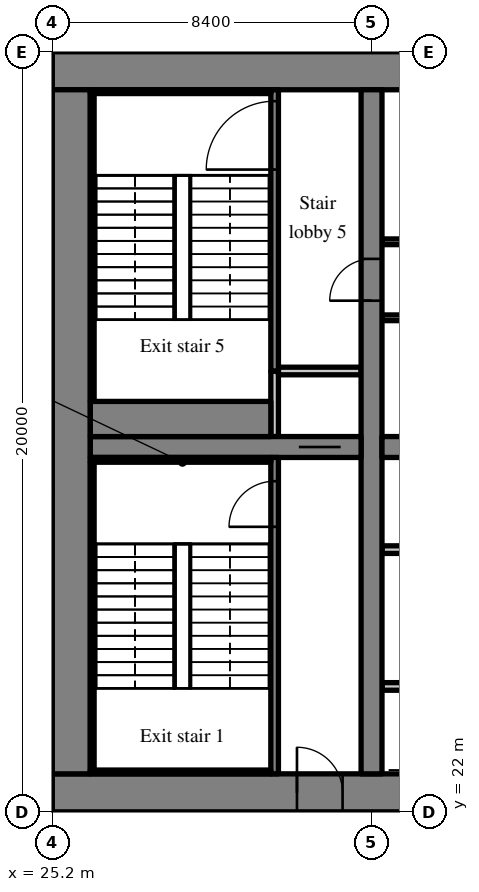
"""IFC4 building model, lengths in metres.
Left out: names, types, materials, properties, quantities, classifications, styles, units other than length and angle.
Written with IfcOpenShell. Run it as: python <this file> out.ifc"""

import sys

from ifc_helpers import new_model, si_unit, direction, frame, frame_2d, origin, place, context, subcontext, project, spatial, rectangle, extrude, source, transform, mapped, element, fill, save


model = new_model("IFC4")
c1 = context("Model", 3, precision=1e-05, world=origin(), true_north=direction((0.0, 1.0)))
c2 = subcontext(c1, "Body", "Model", "MODEL_VIEW")
j1 = project(units=[si_unit("LENGTHUNIT", "METRE"), si_unit("PLANEANGLEUNIT", "RADIAN")], contexts=[c1])
p1 = place(None, origin())
s1 = spatial("IfcSite", under=j1, at=p1, CompositionType="ELEMENT")
p2 = place(p1, origin())
s2 = spatial("IfcBuilding", under=s1, at=p2, CompositionType="ELEMENT")
p3 = place(p2, frame((0.0, 0.0, 77.2)))
s3 = spatial("IfcBuildingStorey", under=s2, at=p3, CompositionType="ELEMENT", Elevation=77.2)
m1 = source(origin(), c2, "Body", "SweptSolid", [
    extrude(rectangle(XDim=50.4, YDim=1.0, at=frame_2d((25.2, 0.0))), origin(), (0.0, 0.0, 1.0), 3.52),
])
p4 = place(p3, frame((25.2, 22.5, 0.0), z_axis=(0.0, 0.0, 1.0), x_axis=(1.0, 0.0, 0.0)))
e1 = element("IfcWall", 1, at=p4, inside=s3, PredefinedType="SHEAR", context=c2, shape_type="MappedRepresentation", body=[
    mapped(m1, transform((0.0, 0.0, 0.0), scale=1.0)),
])
m2 = source(origin(), c2, "Body", "SweptSolid", [
    extrude(rectangle(XDim=1.8, YDim=2.1, at=frame_2d((0.9, 1.05))), frame((0.0, 0.51, 0.0), z_axis=(0.0, -1.0, 0.0), x_axis=(1.0, 0.0, 0.0)), (0.0, 0.0, 1.0), 1.02),
])
p5 = place(p4, frame((15.9, 0.0, 0.0)))
e2 = element("IfcOpeningElement", 2, at=p5, cuts=e1, PredefinedType="OPENING", context=c2, shape_type="MappedRepresentation", body=[
    mapped(m2, transform((0.0, 0.0, 0.0), scale=1.0)),
])
m3 = source(origin(), c2, "Body", "SweptSolid", [
    extrude(rectangle(XDim=1.2, YDim=2.1, at=frame_2d((0.6, 1.05))), frame((0.0, 0.51, 0.0), z_axis=(0.0, -1.0, 0.0), x_axis=(1.0, 0.0, 0.0)), (0.0, 0.0, 1.0), 1.02),
])
p6 = place(p4, frame((26.987, 0.0, 0.0)))
e3 = element("IfcOpeningElement", 3, at=p6, cuts=e1, PredefinedType="OPENING", context=c2, shape_type="MappedRepresentation", body=[
    mapped(m3, transform((0.0, 0.0, 0.0), scale=1.0)),
])
m4 = source(origin(), c2, "Body", "SweptSolid", [
    extrude(rectangle(XDim=0.9, YDim=2.1, at=frame_2d((0.45, 1.05))), frame((0.0, 0.51, 0.0), z_axis=(0.0, -1.0, 0.0), x_axis=(1.0, 0.0, 0.0)), (0.0, 0.0, 1.0), 1.02),
])
p7 = place(p4, frame((32.25, 0.0, 0.0)))
e4 = element("IfcOpeningElement", 4, at=p7, cuts=e1, PredefinedType="OPENING", context=c2, shape_type="MappedRepresentation", body=[
    mapped(m4, transform((0.0, 0.0, 0.0), scale=1.0)),
])
p8 = place(p4, frame((38.262, 0.0, 0.0)))
e5 = element("IfcOpeningElement", 5, at=p8, cuts=e1, PredefinedType="OPENING", context=c2, shape_type="MappedRepresentation", body=[
    mapped(m4, transform((0.0, 0.0, 0.0), scale=1.0)),
])
p9 = place(p4, frame((6.438, 0.0, 0.0)))
e6 = element("IfcOpeningElement", 6, at=p9, cuts=e1, PredefinedType="OPENING", context=c2, shape_type="MappedRepresentation", body=[
    mapped(m3, transform((0.0, 0.0, 0.0), scale=1.0)),
])
p10 = place(p4, frame((47.725, 0.0, 0.0)))
e7 = element("IfcOpeningElement", 7, at=p10, cuts=e1, PredefinedType="OPENING", context=c2, shape_type="MappedRepresentation", body=[
    mapped(m3, transform((0.0, 0.0, 0.0), scale=1.0)),
])
p11 = place(p3, frame((25.2, 41.5, 0.0), z_axis=(0.0, 0.0, 1.0), x_axis=(1.0, 0.0, 0.0)))
e8 = element("IfcWall", 8, at=p11, inside=s3, PredefinedType="SHEAR", context=c2, shape_type="MappedRepresentation", body=[
    mapped(m1, transform((0.0, 0.0, 0.0), scale=1.0)),
])
m5 = source(origin(), c2, "Body", "SweptSolid", [
    extrude(rectangle(XDim=18.0, YDim=1.0, at=frame_2d((9.0, 0.0))), origin(), (0.0, 0.0, 1.0), 3.52),
])
p12 = place(p3, frame((25.7, 23.0, 0.0), z_axis=(0.0, 0.0, 1.0), x_axis=(0.0, 1.0, 0.0)))
e9 = element("IfcWall", 9, at=p12, inside=s3, PredefinedType="SHEAR", context=c2, shape_type="MappedRepresentation", body=[
    mapped(m5, transform((0.0, 0.0, 0.0), scale=1.0)),
])
m6 = source(origin(), c2, "Body", "SweptSolid", [
    extrude(rectangle(XDim=18.0, YDim=0.55, at=frame_2d((9.0, 0.0))), origin(), (0.0, 0.0, 1.0), 3.52),
])
p13 = place(p3, frame((33.6, 23.0, 0.0), z_axis=(0.0, 0.0, 1.0), x_axis=(0.0, 1.0, 0.0)))
e10 = element("IfcWall", 10, at=p13, inside=s3, PredefinedType="SHEAR", context=c2, shape_type="MappedRepresentation", body=[
    mapped(m6, transform((0.0, 0.0, 0.0), scale=1.0)),
])
m7 = source(origin(), c2, "Body", "SweptSolid", [
    extrude(rectangle(XDim=1.1, YDim=2.1, at=frame_2d((0.55, 1.05))), frame((0.0, 0.285, 0.0), z_axis=(0.0, -1.0, 0.0), x_axis=(1.0, 0.0, 0.0)), (0.0, 0.0, 1.0), 0.57),
])
p14 = place(p13, frame((12.45, 0.0, 0.0)))
e11 = element("IfcOpeningElement", 11, at=p14, cuts=e10, PredefinedType="OPENING", context=c2, shape_type="MappedRepresentation", body=[
    mapped(m7, transform((0.0, 0.0, 0.0), scale=1.0)),
])
m8 = source(origin(), c2, "Body", "SweptSolid", [
    extrude(rectangle(XDim=7.125, YDim=0.55, at=frame_2d((3.562, 0.0))), origin(), (0.0, 0.0, 1.0), 3.52),
])
p15 = place(p3, frame((26.2, 31.6, 0.0), z_axis=(0.0, 0.0, 1.0), x_axis=(1.0, 0.0, 0.0)))
e12 = element("IfcWall", 12, at=p15, inside=s3, PredefinedType="SHEAR", context=c2, shape_type="MappedRepresentation", body=[
    mapped(m8, transform((0.0, 0.0, 0.0), scale=1.0)),
])
p16 = place(p15, frame((5.488, 0.0, 0.0)))
e13 = element("IfcOpeningElement", 13, at=p16, cuts=e12, PredefinedType="OPENING", context=c2, shape_type="MappedRepresentation", body=[
    mapped(m7, transform((0.0, 0.0, 0.0), scale=1.0)),
])
m9 = source(origin(), c2, "Body", "SweptSolid", [
    extrude(rectangle(XDim=16.25, YDim=0.55, at=frame_2d((8.125, 0.0))), origin(), (0.0, 0.0, 1.0), 3.52),
])
p17 = place(p3, frame((33.875, 31.6, 0.0), z_axis=(0.0, 0.0, 1.0), x_axis=(1.0, 0.0, 0.0)))
e14 = element("IfcWall", 14, at=p17, inside=s3, PredefinedType="SHEAR", context=c2, shape_type="MappedRepresentation", body=[
    mapped(m9, transform((0.0, 0.0, 0.0), scale=1.0)),
])
m10 = source(origin(), c2, "Body", "SweptSolid", [
    extrude(rectangle(XDim=1.0, YDim=2.1, at=frame_2d((0.5, 1.05))), frame((0.0, 0.285, 0.0), z_axis=(0.0, -1.0, 0.0), x_axis=(1.0, 0.0, 0.0)), (0.0, 0.0, 1.0), 0.57),
])
p18 = place(p17, frame((14.687, 0.0, 0.0)))
e15 = element("IfcOpeningElement", 15, at=p18, cuts=e14, PredefinedType="OPENING", context=c2, shape_type="MappedRepresentation", body=[
    mapped(m10, transform((0.0, 0.0, 0.0), scale=1.0)),
])
m11 = source(origin(), c2, "Body", "SweptSolid", [
    extrude(rectangle(XDim=3.559, YDim=0.3, at=frame_2d((1.78, 0.0))), origin(), (0.0, 0.0, 1.0), 3.52),
])
p19 = place(p3, frame((25.55, 39.969, 0.0), z_axis=(0.0, 0.0, 1.0), x_axis=(-0.35779745313, 0.933799219604, 0.0)))
e16 = element("IfcWall", 16, at=p19, inside=s3, PredefinedType="SOLIDWALL", context=c2, shape_type="MappedRepresentation", body=[
    mapped(m11, transform((0.0, 0.0, 0.0), scale=1.0)),
])
m12 = source(origin(), c2, "Body", "SweptSolid", [
    extrude(rectangle(XDim=1.5, YDim=2.0, at=frame_2d((0.75, 1.0))), frame((0.0, 0.16, 0.0), z_axis=(0.0, -1.0, 0.0), x_axis=(1.0, 0.0, 0.0)), (0.0, 0.0, 1.0), 0.32),
])
p20 = place(p19, frame((1.903, 0.0, 0.9)))
e17 = element("IfcOpeningElement", 17, at=p20, cuts=e16, PredefinedType="OPENING", context=c2, shape_type="MappedRepresentation", body=[
    mapped(m12, transform((0.0, 0.0, 0.0), scale=1.0)),
])
m13 = source(origin(), c2, "Body", "SweptSolid", [
    extrude(rectangle(XDim=6.025, YDim=0.2, at=frame_2d((3.012, 0.0))), origin(), (0.0, 0.0, 1.0), 3.52),
])
p21 = place(p3, frame((33.875, 25.3, 0.0), z_axis=(0.0, 0.0, 1.0), x_axis=(1.0, 0.0, 0.0)))
e18 = element("IfcWall", 18, at=p21, inside=s3, PredefinedType="SOLIDWALL", context=c2, shape_type="MappedRepresentation", body=[
    mapped(m13, transform((0.0, 0.0, 0.0), scale=1.0)),
])
m14 = source(origin(), c2, "Body", "SweptSolid", [
    extrude(rectangle(XDim=1.1, YDim=2.1, at=frame_2d((0.55, 1.05))), frame((0.0, 0.11, 0.0), z_axis=(0.0, -1.0, 0.0), x_axis=(1.0, 0.0, 0.0)), (0.0, 0.0, 1.0), 0.22),
])
p22 = place(p21, frame((0.975, 0.0, 0.0)))
e19 = element("IfcOpeningElement", 19, at=p22, cuts=e18, PredefinedType="OPENING", context=c2, shape_type="MappedRepresentation", body=[
    mapped(m14, transform((0.0, 0.0, 0.0), scale=1.0)),
])
p23 = place(p21, frame((3.975, 0.0, 0.0)))
e20 = element("IfcOpeningElement", 20, at=p23, cuts=e18, PredefinedType="OPENING", context=c2, shape_type="MappedRepresentation", body=[
    mapped(m14, transform((0.0, 0.0, 0.0), scale=1.0)),
])
m15 = source(origin(), c2, "Body", "SweptSolid", [
    extrude(rectangle(XDim=12.025, YDim=0.2, at=frame_2d((6.012, 0.0))), origin(), (0.0, 0.0, 1.0), 3.52),
])
p24 = place(p3, frame((33.875, 28.9, 0.0), z_axis=(0.0, 0.0, 1.0), x_axis=(1.0, 0.0, 0.0)))
e21 = element("IfcWall", 21, at=p24, inside=s3, PredefinedType="SOLIDWALL", context=c2, shape_type="MappedRepresentation", body=[
    mapped(m15, transform((0.0, 0.0, 0.0), scale=1.0)),
])
p25 = place(p24, frame((0.975, 0.0, 0.0)))
e22 = element("IfcOpeningElement", 22, at=p25, cuts=e21, PredefinedType="OPENING", context=c2, shape_type="MappedRepresentation", body=[
    mapped(m14, transform((0.0, 0.0, 0.0), scale=1.0)),
])
p26 = place(p24, frame((3.975, 0.0, 0.0)))
e23 = element("IfcOpeningElement", 23, at=p26, cuts=e21, PredefinedType="OPENING", context=c2, shape_type="MappedRepresentation", body=[
    mapped(m14, transform((0.0, 0.0, 0.0), scale=1.0)),
])
p27 = place(p24, frame((6.975, 0.0, 0.0)))
e24 = element("IfcOpeningElement", 24, at=p27, cuts=e21, PredefinedType="OPENING", context=c2, shape_type="MappedRepresentation", body=[
    mapped(m14, transform((0.0, 0.0, 0.0), scale=1.0)),
])
p28 = place(p24, frame((9.975, 0.0, 0.0)))
e25 = element("IfcOpeningElement", 25, at=p28, cuts=e21, PredefinedType="OPENING", context=c2, shape_type="MappedRepresentation", body=[
    mapped(m14, transform((0.0, 0.0, 0.0), scale=1.0)),
])
m16 = source(origin(), c2, "Body", "SweptSolid", [
    extrude(rectangle(XDim=14.125, YDim=0.15, at=frame_2d((7.062, 0.0))), origin(), (0.0, 0.0, 1.0), 3.52),
])
p29 = place(p3, frame((33.875, 35.0, 0.0), z_axis=(0.0, 0.0, 1.0), x_axis=(1.0, 0.0, 0.0)))
e26 = element("IfcWall", 26, at=p29, inside=s3, PredefinedType="PARTITIONING", context=c2, shape_type="MappedRepresentation", body=[
    mapped(m16, transform((0.0, 0.0, 0.0), scale=1.0)),
])
m17 = source(origin(), c2, "Body", "SweptSolid", [
    extrude(rectangle(XDim=0.9, YDim=2.1, at=frame_2d((0.45, 1.05))), frame((0.0, 0.085, 0.0), z_axis=(0.0, -1.0, 0.0), x_axis=(1.0, 0.0, 0.0)), (0.0, 0.0, 1.0), 0.17),
])
p30 = place(p29, frame((3.414, 0.0, 0.0)))
e27 = element("IfcOpeningElement", 27, at=p30, cuts=e26, PredefinedType="OPENING", context=c2, shape_type="MappedRepresentation", body=[
    mapped(m17, transform((0.0, 0.0, 0.0), scale=1.0)),
])
p31 = place(p29, frame((10.439, 0.0, 0.0)))
e28 = element("IfcOpeningElement", 28, at=p31, cuts=e26, PredefinedType="OPENING", context=c2, shape_type="MappedRepresentation", body=[
    mapped(m17, transform((0.0, 0.0, 0.0), scale=1.0)),
])
m18 = source(origin(), c2, "Body", "SweptSolid", [
    extrude(rectangle(XDim=16.25, YDim=0.15, at=frame_2d((8.125, 0.0))), origin(), (0.0, 0.0, 1.0), 3.52),
])
p32 = place(p3, frame((33.875, 37.0, 0.0), z_axis=(0.0, 0.0, 1.0), x_axis=(1.0, 0.0, 0.0)))
e29 = element("IfcWall", 29, at=p32, inside=s3, PredefinedType="PARTITIONING", context=c2, shape_type="MappedRepresentation", body=[
    mapped(m18, transform((0.0, 0.0, 0.0), scale=1.0)),
])
p33 = place(p32, frame((1.581, 0.0, 0.0)))
e30 = element("IfcOpeningElement", 30, at=p33, cuts=e29, PredefinedType="OPENING", context=c2, shape_type="MappedRepresentation", body=[
    mapped(m17, transform((0.0, 0.0, 0.0), scale=1.0)),
])
p34 = place(p32, frame((7.269, 0.0, 0.0)))
e31 = element("IfcOpeningElement", 31, at=p34, cuts=e29, PredefinedType="OPENING", context=c2, shape_type="MappedRepresentation", body=[
    mapped(m17, transform((0.0, 0.0, 0.0), scale=1.0)),
])
p35 = place(p32, frame((12.144, 0.0, 0.0)))
e32 = element("IfcOpeningElement", 32, at=p35, cuts=e29, PredefinedType="OPENING", context=c2, shape_type="MappedRepresentation", body=[
    mapped(m17, transform((0.0, 0.0, 0.0), scale=1.0)),
])
p36 = place(p32, frame((14.581, 0.0, 0.0)))
e33 = element("IfcOpeningElement", 33, at=p36, cuts=e29, PredefinedType="OPENING", context=c2, shape_type="MappedRepresentation", body=[
    mapped(m17, transform((0.0, 0.0, 0.0), scale=1.0)),
])
m19 = source(origin(), c2, "Body", "SweptSolid", [
    extrude(rectangle(XDim=8.325, YDim=0.2, at=frame_2d((4.163, 0.0))), origin(), (0.0, 0.0, 1.0), 3.52),
])
p37 = place(p3, frame((31.05, 23.0, 0.0), z_axis=(0.0, 0.0, 1.0), x_axis=(0.0, 1.0, 0.0)))
e34 = element("IfcWall", 34, at=p37, inside=s3, PredefinedType="SOLIDWALL", context=c2, shape_type="MappedRepresentation", body=[
    mapped(m19, transform((0.0, 0.0, 0.0), scale=1.0)),
])
m20 = source(origin(), c2, "Body", "SweptSolid", [
    extrude(rectangle(XDim=1.2, YDim=2.1, at=frame_2d((0.6, 1.05))), frame((0.0, 0.11, 0.0), z_axis=(0.0, -1.0, 0.0), x_axis=(1.0, 0.0, 0.0)), (0.0, 0.0, 1.0), 0.22),
])
p38 = place(p37, frame((6.5, 0.0, 0.0)))
e35 = element("IfcOpeningElement", 35, at=p38, cuts=e34, PredefinedType="OPENING", context=c2, shape_type="MappedRepresentation", body=[
    mapped(m20, transform((0.0, 0.0, 0.0), scale=1.0)),
])
m21 = source(origin(), c2, "Body", "SweptSolid", [
    extrude(rectangle(XDim=1.725, YDim=0.2, at=frame_2d((0.863, 0.0))), origin(), (0.0, 0.0, 1.0), 3.52),
])
p39 = place(p3, frame((31.05, 31.875, 0.0), z_axis=(0.0, 0.0, 1.0), x_axis=(0.0, 1.0, 0.0)))
e36 = element("IfcWall", 36, at=p39, inside=s3, PredefinedType="SOLIDWALL", context=c2, shape_type="MappedRepresentation", body=[
    mapped(m21, transform((0.0, 0.0, 0.0), scale=1.0)),
])
m22 = source(origin(), c2, "Body", "SweptSolid", [
    extrude(rectangle(XDim=2.175, YDim=0.2, at=frame_2d((1.087, 0.0))), origin(), (0.0, 0.0, 1.0), 3.52),
])
p40 = place(p3, frame((31.15, 33.6, 0.0), z_axis=(0.0, 0.0, 1.0), x_axis=(1.0, 0.0, 0.0)))
e37 = element("IfcWall", 37, at=p40, inside=s3, PredefinedType="SOLIDWALL", context=c2, shape_type="MappedRepresentation", body=[
    mapped(m22, transform((0.0, 0.0, 0.0), scale=1.0)),
])
m23 = source(origin(), c2, "Body", "SweptSolid", [
    extrude(rectangle(XDim=7.4, YDim=0.2, at=frame_2d((3.7, 0.0))), origin(), (0.0, 0.0, 1.0), 3.52),
])
p41 = place(p3, frame((31.05, 33.6, 0.0), z_axis=(0.0, 0.0, 1.0), x_axis=(0.0, 1.0, 0.0)))
e38 = element("IfcWall", 38, at=p41, inside=s3, PredefinedType="SOLIDWALL", context=c2, shape_type="MappedRepresentation", body=[
    mapped(m23, transform((0.0, 0.0, 0.0), scale=1.0)),
])
m24 = source(origin(), c2, "Body", "SweptSolid", [
    extrude(rectangle(XDim=1.8, YDim=2.1, at=frame_2d((0.9, 1.05))), frame((0.0, 0.11, 0.0), z_axis=(0.0, -1.0, 0.0), x_axis=(1.0, 0.0, 0.0)), (0.0, 0.0, 1.0), 0.22),
])
p42 = place(p41, frame((5.3, 0.0, 0.0)))
e39 = element("IfcOpeningElement", 39, at=p42, cuts=e38, PredefinedType="OPENING", context=c2, shape_type="MappedRepresentation", body=[
    mapped(m24, transform((0.0, 0.0, 0.0), scale=1.0)),
])
m25 = source(origin(), c2, "Body", "SweptSolid", [
    extrude(rectangle(XDim=8.2, YDim=0.2, at=frame_2d((4.1, 0.0))), origin(), (0.0, 0.0, 1.0), 3.52),
])
p43 = place(p3, frame((17.0, 22.1, 0.0), z_axis=(0.0, 0.0, 1.0), x_axis=(1.0, 0.0, 0.0)))
e40 = element("IfcWall", 40, at=p43, inside=s3, PredefinedType="SOLIDWALL", context=c2, shape_type="MappedRepresentation", body=[
    mapped(m25, transform((0.0, 0.0, 0.0), scale=1.0)),
])
p44 = place(p43, frame((6.0, 0.0, 0.0)))
e41 = element("IfcOpeningElement", 41, at=p44, cuts=e40, PredefinedType="OPENING", context=c2, shape_type="MappedRepresentation", body=[
    mapped(m20, transform((0.0, 0.0, 0.0), scale=1.0)),
])
p45 = place(p3, frame((17.0, 30.4, 0.0), z_axis=(0.0, 0.0, 1.0), x_axis=(1.0, 0.0, 0.0)))
e42 = element("IfcWall", 42, at=p45, inside=s3, PredefinedType="SOLIDWALL", context=c2, shape_type="MappedRepresentation", body=[
    mapped(m25, transform((0.0, 0.0, 0.0), scale=1.0)),
])
m26 = source(origin(), c2, "Body", "SweptSolid", [
    extrude(rectangle(XDim=1.0, YDim=2.1, at=frame_2d((0.5, 1.05))), frame((0.0, 0.11, 0.0), z_axis=(0.0, -1.0, 0.0), x_axis=(1.0, 0.0, 0.0)), (0.0, 0.0, 1.0), 0.22),
])
p46 = place(p45, frame((6.1, 0.0, 0.0)))
e43 = element("IfcOpeningElement", 43, at=p46, cuts=e42, PredefinedType="OPENING", context=c2, shape_type="MappedRepresentation", body=[
    mapped(m26, transform((0.0, 0.0, 0.0), scale=1.0)),
])
m27 = source(origin(), c2, "Body", "SweptSolid", [
    extrude(rectangle(XDim=4.75, YDim=0.1, at=frame_2d((2.375, 0.0))), origin(), (0.0, 0.0, 1.0), 3.52),
])
p47 = place(p3, frame((26.2, 23.05, 0.0), z_axis=(0.0, 0.0, 1.0), x_axis=(1.0, 0.0, 0.0)))
e44 = element("IfcWall", 44, at=p47, inside=s3, PredefinedType="SOLIDWALL", context=c2, shape_type="MappedRepresentation", body=[
    mapped(m27, transform((0.0, 0.0, 0.0), scale=1.0)),
])
m28 = source(origin(), c2, "Body", "SweptSolid", [
    extrude(rectangle(XDim=4.75, YDim=0.125, at=frame_2d((2.375, 0.0))), origin(), (0.0, 0.0, 1.0), 3.52),
])
p48 = place(p3, frame((26.2, 31.262, 0.0), z_axis=(0.0, 0.0, 1.0), x_axis=(1.0, 0.0, 0.0)))
e45 = element("IfcWall", 45, at=p48, inside=s3, PredefinedType="SOLIDWALL", context=c2, shape_type="MappedRepresentation", body=[
    mapped(m28, transform((0.0, 0.0, 0.0), scale=1.0)),
])
m29 = source(origin(), c2, "Body", "SweptSolid", [
    extrude(rectangle(XDim=8.1, YDim=0.1, at=frame_2d((4.05, 0.0))), origin(), (0.0, 0.0, 1.0), 3.52),
])
p49 = place(p3, frame((26.25, 23.1, 0.0), z_axis=(0.0, 0.0, 1.0), x_axis=(0.0, 1.0, 0.0)))
e46 = element("IfcWall", 46, at=p49, inside=s3, PredefinedType="SOLIDWALL", context=c2, shape_type="MappedRepresentation", body=[
    mapped(m29, transform((0.0, 0.0, 0.0), scale=1.0)),
])
p50 = place(p3, frame((26.2, 40.95, 0.0), z_axis=(0.0, 0.0, 1.0), x_axis=(1.0, 0.0, 0.0)))
e47 = element("IfcWall", 47, at=p50, inside=s3, PredefinedType="SOLIDWALL", context=c2, shape_type="MappedRepresentation", body=[
    mapped(m27, transform((0.0, 0.0, 0.0), scale=1.0)),
])
m30 = source(origin(), c2, "Body", "SweptSolid", [
    extrude(rectangle(XDim=4.75, YDim=0.925, at=frame_2d((2.375, 0.0))), origin(), (0.0, 0.0, 1.0), 3.52),
])
p51 = place(p3, frame((26.2, 32.337, 0.0), z_axis=(0.0, 0.0, 1.0), x_axis=(1.0, 0.0, 0.0)))
e48 = element("IfcWall", 48, at=p51, inside=s3, PredefinedType="SOLIDWALL", context=c2, shape_type="MappedRepresentation", body=[
    mapped(m30, transform((0.0, 0.0, 0.0), scale=1.0)),
])
p52 = place(p3, frame((26.25, 32.8, 0.0), z_axis=(0.0, 0.0, 1.0), x_axis=(0.0, 1.0, 0.0)))
e49 = element("IfcWall", 49, at=p52, inside=s3, PredefinedType="SOLIDWALL", context=c2, shape_type="MappedRepresentation", body=[
    mapped(m29, transform((0.0, 0.0, 0.0), scale=1.0)),
])
m31 = source(origin(), c2, "Body", "SweptSolid", [
    extrude(rectangle(XDim=1.2, YDim=2.1, at=frame_2d((0.6, 1.05))), frame((0.0, 0.025, 0.0), z_axis=(0.0, -1.0, 0.0), x_axis=(1.0, 0.0, 0.0)), (0.0, 0.0, 1.0), 0.05),
])
p53 = place(p38, origin())
e50 = element("IfcDoor", 50, at=p53, inside=s3, OperationType="SINGLE_SWING_LEFT", PredefinedType="DOOR", context=c2, shape_type="MappedRepresentation", body=[
    mapped(m31, transform((0.0, 0.0, 0.0), scale=1.0)),
])
fill(e35, e50)
m32 = source(origin(), c2, "Body", "SweptSolid", [
    extrude(rectangle(XDim=1.2, YDim=2.1, at=frame_2d((0.6, 1.05))), frame((0.0, 0.375, 0.0), z_axis=(0.0, -1.0, 0.0), x_axis=(1.0, 0.0, 0.0)), (0.0, 0.0, 1.0), 0.05),
])
p54 = place(p9, origin())
e51 = element("IfcDoor", 51, at=p54, inside=s3, OperationType="SINGLE_SWING_LEFT", PredefinedType="DOOR", context=c2, shape_type="MappedRepresentation", body=[
    mapped(m32, transform((0.0, 0.0, 0.0), scale=1.0)),
])
fill(e6, e51)
m33 = source(origin(), c2, "Body", "SweptSolid", [
    extrude(rectangle(XDim=1.1, YDim=2.1, at=frame_2d((0.55, 1.05))), frame((0.0, 0.025, 0.0), z_axis=(0.0, -1.0, 0.0), x_axis=(1.0, 0.0, 0.0)), (0.0, 0.0, 1.0), 0.05),
])
p55 = place(p16, origin())
e52 = element("IfcDoor", 52, at=p55, inside=s3, OperationType="SLIDING_TO_RIGHT", PredefinedType="DOOR", context=c2, shape_type="MappedRepresentation", body=[
    mapped(m33, transform((0.0, 0.0, 0.0), scale=1.0)),
])
fill(e13, e52)
m34 = source(origin(), c2, "Body", "SweptSolid", [
    extrude(rectangle(XDim=1.8, YDim=2.1, at=frame_2d((0.9, 1.05))), frame((0.0, 0.025, 0.0), z_axis=(0.0, -1.0, 0.0), x_axis=(1.0, 0.0, 0.0)), (0.0, 0.0, 1.0), 0.05),
])
p56 = place(p42, origin())
e53 = element("IfcDoor", 53, at=p56, inside=s3, OperationType="SINGLE_SWING_LEFT", PredefinedType="DOOR", context=c2, shape_type="MappedRepresentation", body=[
    mapped(m34, transform((0.0, 0.0, 0.0), scale=1.0)),
])
fill(e39, e53)
p57 = place(p14, origin())
e54 = element("IfcDoor", 54, at=p57, inside=s3, OperationType="SINGLE_SWING_LEFT", PredefinedType="DOOR", context=c2, shape_type="MappedRepresentation", body=[
    mapped(m33, transform((0.0, 0.0, 0.0), scale=1.0)),
])
fill(e11, e54)
save(model, sys.argv[1])
